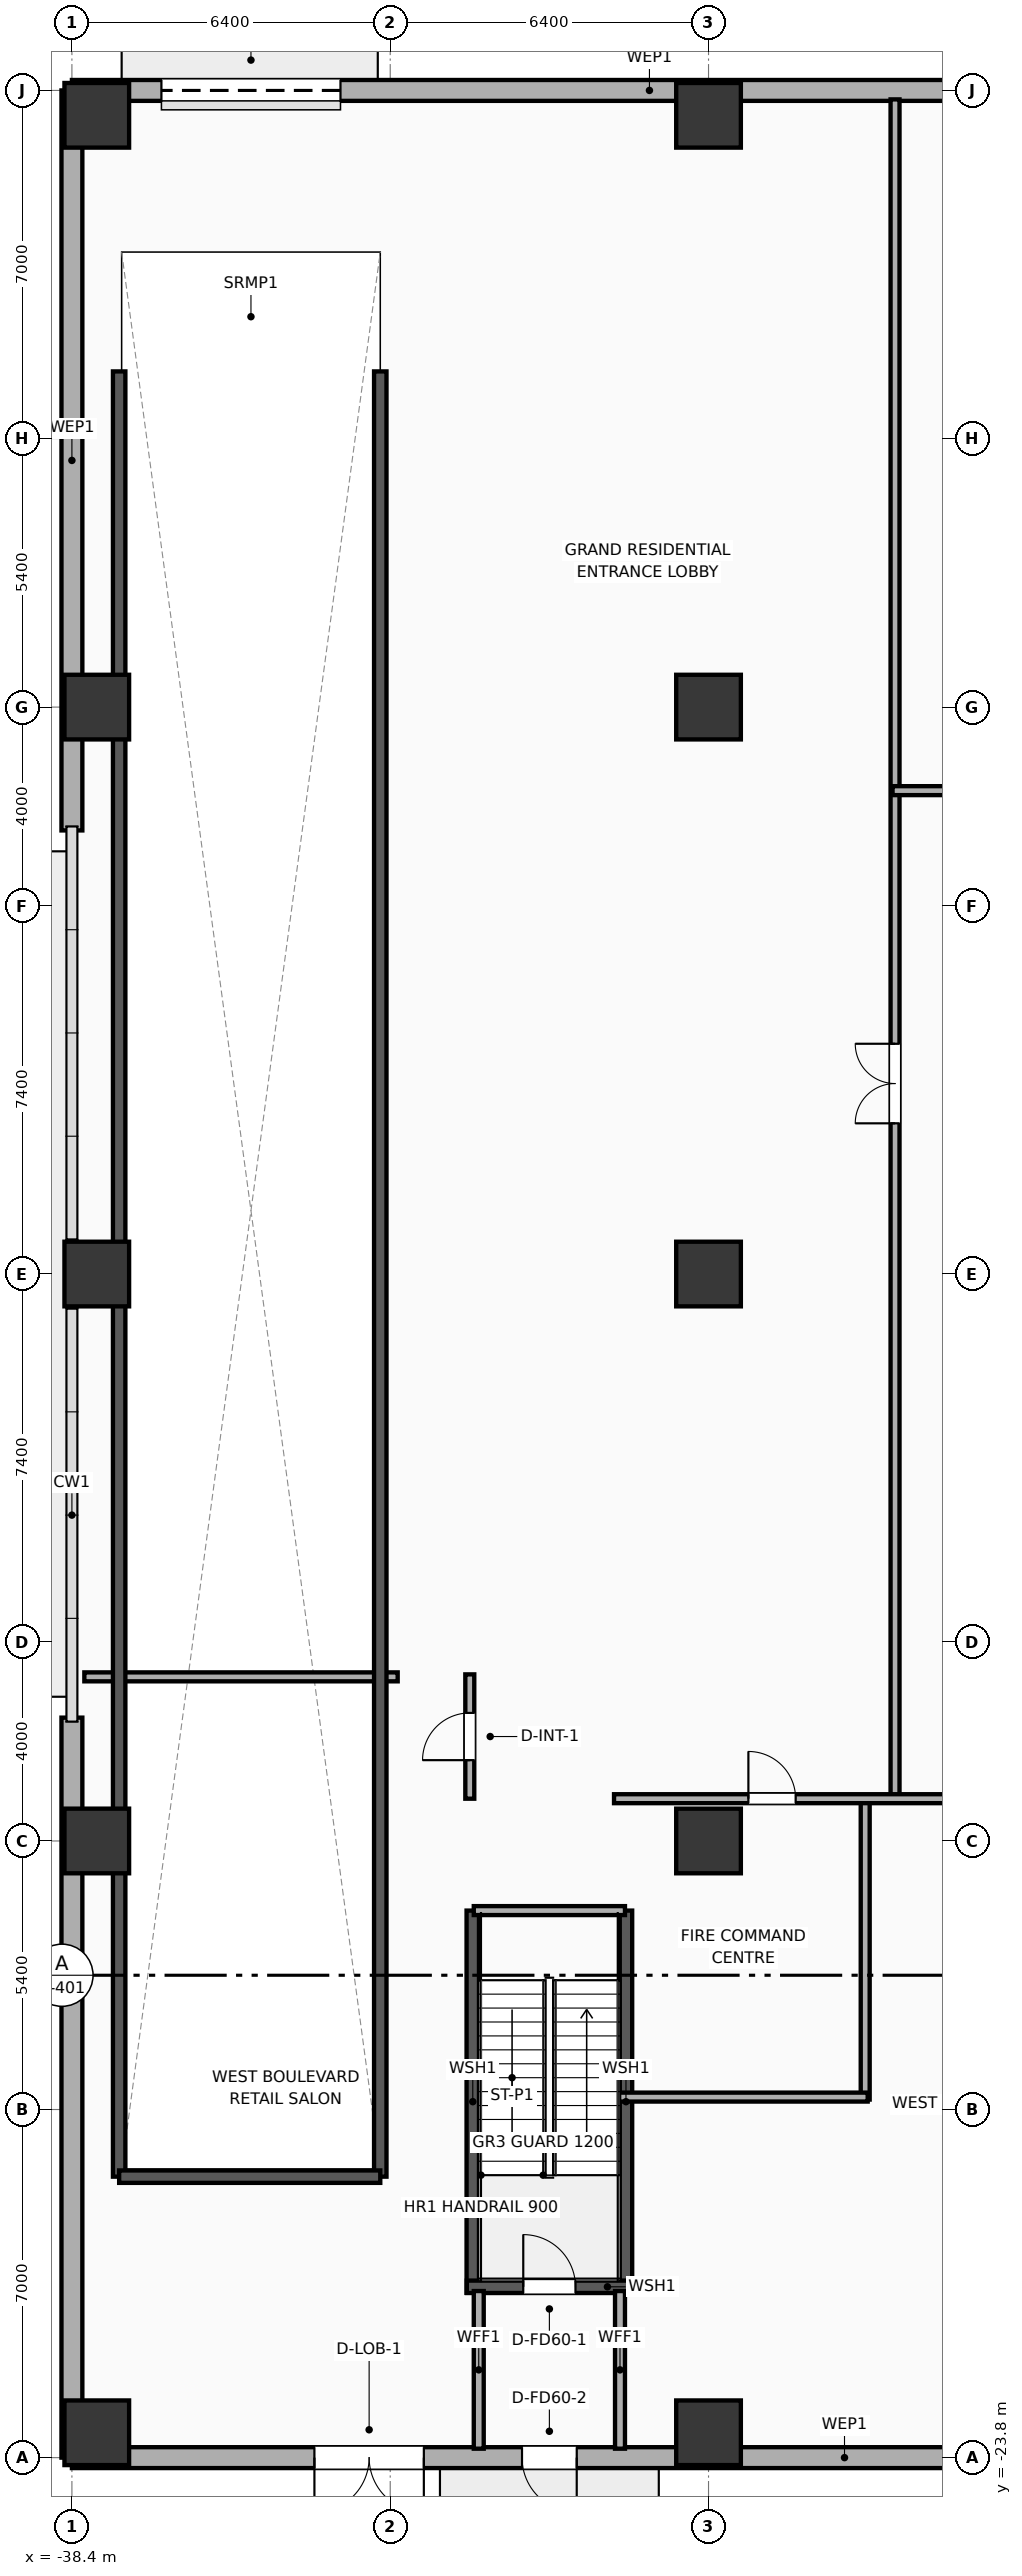
"""IFC4 building model, lengths in metres.
Left out: names, types, materials, properties, quantities, classifications, styles, units other than length and angle.
Written with IfcOpenShell. Run it as: python <this file> out.ifc"""

import sys

from ifc_helpers import new_model, si_unit, direction, frame, frame_2d, origin, origin_2d, place, context, subcontext, project, spatial, rectangle, extrude, element, fill, save


model = new_model("IFC4")
c1 = context("Model", 3, precision=1e-05, world=origin(), true_north=direction((0.0, 1.0)))
c2 = subcontext(c1, "Body", "Model", "MODEL_VIEW")
j1 = project(units=[si_unit("LENGTHUNIT", "METRE"), si_unit("PLANEANGLEUNIT", "RADIAN")], contexts=[c1])
p1 = place(None, origin())
s1 = spatial("IfcSite", under=j1, at=p1, CompositionType="ELEMENT")
p2 = place(p1, origin())
s2 = spatial("IfcBuilding", under=s1, at=p2, CompositionType="ELEMENT")
p3 = place(p2, origin())
s3 = spatial("IfcBuildingStorey", under=s2, at=p3, CompositionType="ELEMENT", Elevation=0.0)
for number, where, z_axis, x_axis in (
    (1, (-30.34, -20.485, 0.0), (0.0, 0.0, 1.0), (0.0, 1.0, 0.0)),
    (2, (-27.26, -20.485, 0.0), (0.0, 0.0, 1.0), (0.0, 1.0, 0.0)),
):
    element("IfcWall", number, at=place(p3, frame(where, z_axis=z_axis, x_axis=x_axis)), inside=s3, PredefinedType="SOLIDWALL", context=c2, shape_type="SweptSolid", body=[
        extrude(rectangle(XDim=7.685, YDim=0.25, at=frame_2d((3.843, 0.0))), origin(), (0.0, 0.0, 1.0), 4.92),
    ])
p4 = place(p3, frame((-30.46, -20.365, 0.0), z_axis=(0.0, 0.0, 1.0), x_axis=(1.0, 0.0, 0.0)))
e3 = element("IfcWall", 3, at=p4, inside=s3, PredefinedType="SOLIDWALL", context=c2, shape_type="SweptSolid", body=[
    extrude(rectangle(XDim=3.32, YDim=0.25, at=frame_2d((1.66, 0.0))), origin(), (0.0, 0.0, 1.0), 4.92),
])
p5 = place(p4, frame((1.135, 0.0, 0.0)))
e4 = element("IfcOpeningElement", 4, at=p5, cuts=e3, PredefinedType="OPENING", context=c2, shape_type="SweptSolid", body=[
    extrude(rectangle(XDim=1.05, YDim=2.05, at=frame_2d((0.525, 1.025))), frame((0.0, 0.135, 0.0), z_axis=(0.0, -1.0, 0.0), x_axis=(1.0, 0.0, 0.0)), (0.0, 0.0, 1.0), 0.27),
])
for number, where, z_axis, x_axis in (
    (5, (-37.9, -23.3, 0.0), (0.0, 0.0, 1.0), (1.0, 0.0, 0.0)),
    (6, (-37.9, -11.4, 0.0), (0.0, 0.0, 1.0), (1.0, 0.0, 0.0)),
    (7, (-37.9, 0.0, 0.0), (0.0, 0.0, 1.0), (1.0, 0.0, 0.0)),
    (8, (-37.9, 11.4, 0.0), (0.0, 0.0, 1.0), (1.0, 0.0, 0.0)),
    (9, (-37.9, 23.3, 0.0), (0.0, 0.0, 1.0), (1.0, 0.0, 0.0)),
    (10, (-25.6, -23.3, 0.0), (0.0, 0.0, 1.0), (1.0, 0.0, 0.0)),
    (11, (-25.6, -11.4, 0.0), (0.0, 0.0, 1.0), (1.0, 0.0, 0.0)),
    (12, (-25.6, 0.0, 0.0), (0.0, 0.0, 1.0), (1.0, 0.0, 0.0)),
    (13, (-25.6, 11.4, 0.0), (0.0, 0.0, 1.0), (1.0, 0.0, 0.0)),
    (14, (-25.6, 23.3, 0.0), (0.0, 0.0, 1.0), (1.0, 0.0, 0.0)),
):
    element("IfcColumn", number, at=place(p3, frame(where, z_axis=z_axis, x_axis=x_axis)), inside=s3, PredefinedType="COLUMN", context=c2, shape_type="SweptSolid", body=[
        extrude(rectangle(XDim=1.3, YDim=1.3, at=origin_2d()), origin(), (0.0, 0.0, 1.0), 5.2),
    ])
p6 = place(p3, frame((-13.5, -23.8, 0.0), z_axis=(0.0, 0.0, 1.0), x_axis=(-1.0, 0.0, 0.0)))
e15 = element("IfcWall", 15, at=p6, inside=s3, PredefinedType="ELEMENTEDWALL", context=c2, shape_type="SweptSolid", body=[
    extrude(rectangle(XDim=24.9, YDim=0.42, at=frame_2d((12.45, 0.0))), origin(), (0.0, 0.0, 1.0), 4.92),
])
p7 = place(p6, frame((14.75, 0.0, 0.0)))
e16 = element("IfcOpeningElement", 16, at=p7, cuts=e15, PredefinedType="OPENING", context=c2, shape_type="SweptSolid", body=[
    extrude(rectangle(XDim=1.1, YDim=2.05, at=frame_2d((0.55, 1.025))), frame((0.0, 0.22, 0.0), z_axis=(0.0, -1.0, 0.0), x_axis=(1.0, 0.0, 0.0)), (0.0, 0.0, 1.0), 0.44),
])
p8 = place(p6, frame((1.782, 0.0, 0.0)))
e17 = element("IfcOpeningElement", 17, at=p8, cuts=e15, PredefinedType="OPENING", context=c2, shape_type="SweptSolid", body=[
    extrude(rectangle(XDim=2.2, YDim=2.4, at=frame_2d((1.1, 1.2))), frame((0.0, 0.22, 0.0), z_axis=(0.0, -1.0, 0.0), x_axis=(1.0, 0.0, 0.0)), (0.0, 0.0, 1.0), 0.44),
])
p9 = place(p6, frame((17.824, 0.0, 0.0)))
e18 = element("IfcOpeningElement", 18, at=p9, cuts=e15, PredefinedType="OPENING", context=c2, shape_type="SweptSolid", body=[
    extrude(rectangle(XDim=2.2, YDim=2.4, at=frame_2d((1.1, 1.2))), frame((0.0, 0.22, 0.0), z_axis=(0.0, -1.0, 0.0), x_axis=(1.0, 0.0, 0.0)), (0.0, 0.0, 1.0), 0.44),
])
p10 = place(p3, frame((-13.5, 23.8, 0.0), z_axis=(0.0, 0.0, 1.0), x_axis=(-1.0, 0.0, 0.0)))
e19 = element("IfcWall", 19, at=p10, inside=s3, PredefinedType="ELEMENTEDWALL", context=c2, shape_type="SweptSolid", body=[
    extrude(rectangle(XDim=24.9, YDim=0.42, at=frame_2d((12.45, 0.0))), origin(), (0.0, 0.0, 1.0), 4.92),
])
p11 = place(p10, frame((19.5, 0.0, 0.0)))
e20 = element("IfcOpeningElement", 20, at=p11, cuts=e19, PredefinedType="OPENING", context=c2, shape_type="SweptSolid", body=[
    extrude(rectangle(XDim=3.6, YDim=3.0, at=frame_2d((1.8, 1.5))), frame((0.0, 0.22, 0.0), z_axis=(0.0, -1.0, 0.0), x_axis=(1.0, 0.0, 0.0)), (0.0, 0.0, 1.0), 0.44),
])
p12 = place(p10, frame((4.876, 0.0, 0.0)))
e21 = element("IfcOpeningElement", 21, at=p12, cuts=e19, PredefinedType="OPENING", context=c2, shape_type="SweptSolid", body=[
    extrude(rectangle(XDim=2.2, YDim=2.4, at=frame_2d((1.1, 1.2))), frame((0.0, 0.22, 0.0), z_axis=(0.0, -1.0, 0.0), x_axis=(1.0, 0.0, 0.0)), (0.0, 0.0, 1.0), 0.44),
])
for number, where, z_axis, x_axis in (
    (22, (-38.4, 23.8, 0.0), (0.0, 0.0, 1.0), (0.0, -1.0, 0.0)),
    (23, (-38.4, -8.92, 0.0), (0.0, 0.0, 1.0), (0.0, -1.0, 0.0)),
):
    element("IfcWall", number, at=place(p3, frame(where, z_axis=z_axis, x_axis=x_axis)), inside=s3, PredefinedType="ELEMENTEDWALL", context=c2, shape_type="SweptSolid", body=[
        extrude(rectangle(XDim=14.88, YDim=0.42, at=frame_2d((7.44, 0.0))), origin(), (0.0, 0.0, 1.0), 4.92),
    ])
for number, where, z_axis, x_axis in (
    (24, (-30.22, -23.62, 0.0), (0.0, 0.0, 1.0), (0.0, 1.0, 0.0)),
    (25, (-27.38, -23.62, 0.0), (0.0, 0.0, 1.0), (0.0, 1.0, 0.0)),
):
    element("IfcWall", number, at=place(p3, frame(where, z_axis=z_axis, x_axis=x_axis)), inside=s3, PredefinedType="PARTITIONING", context=c2, shape_type="SweptSolid", body=[
        extrude(rectangle(XDim=3.17, YDim=0.2, at=frame_2d((1.585, 0.0))), origin(), (0.0, 0.0, 1.0), 4.92),
    ])
p13 = place(p3, frame((-30.32, -12.8, 0.0), z_axis=(0.0, 0.0, 1.0), x_axis=(1.0, 0.0, 0.0)))
e26 = element("IfcWall", 26, at=p13, inside=s3, PredefinedType="PARTITIONING", context=c2, shape_type="SweptSolid", body=[
    extrude(rectangle(XDim=3.04, YDim=0.18, at=frame_2d((1.52, 0.0))), origin(), (0.0, 0.0, 1.0), 4.92),
])
p14 = place(p3, frame((-38.15, -8.1, 0.0), z_axis=(0.0, 0.0, 1.0), x_axis=(1.0, 0.0, 0.0)))
e27 = element("IfcWall", 27, at=p14, inside=s3, PredefinedType="PARTITIONING", context=c2, shape_type="SweptSolid", body=[
    extrude(rectangle(XDim=6.3, YDim=0.18, at=frame_2d((3.15, 0.0))), origin(), (0.0, 0.0, 1.0), 4.92),
])
p15 = place(p3, frame((-30.4, -10.55, 0.0), z_axis=(0.0, 0.0, 1.0), x_axis=(0.0, 1.0, 0.0)))
e28 = element("IfcWall", 28, at=p15, inside=s3, PredefinedType="PARTITIONING", context=c2, shape_type="SweptSolid", body=[
    extrude(rectangle(XDim=2.5, YDim=0.18, at=frame_2d((1.25, 0.0))), origin(), (0.0, 0.0, 1.0), 4.92),
])
p16 = place(p15, frame((0.775, 0.0, 0.0)))
e29 = element("IfcOpeningElement", 29, at=p16, cuts=e28, PredefinedType="OPENING", context=c2, shape_type="SweptSolid", body=[
    extrude(rectangle(XDim=0.95, YDim=2.05, at=frame_2d((0.475, 1.025))), frame((0.0, 0.1, 0.0), z_axis=(0.0, -1.0, 0.0), x_axis=(1.0, 0.0, 0.0)), (0.0, 0.0, 1.0), 0.2),
])
for number, where, z_axis, x_axis in (
    (30, (-37.45, -18.15, 0.0), (0.0, 0.0, 1.0), (0.0, 1.0, 0.0)),
    (31, (-32.2, -18.15, 0.0), (0.0, 0.0, 1.0), (0.0, 1.0, 0.0)),
):
    element("IfcWall", number, at=place(p3, frame(where, z_axis=z_axis, x_axis=x_axis)), inside=s3, PredefinedType="SOLIDWALL", context=c2, shape_type="SweptSolid", body=[
        extrude(rectangle(XDim=36.3, YDim=0.25, at=frame_2d((18.15, 0.0))), origin(), (0.0, 0.0, 1.0), 4.92),
    ])
p17 = place(p3, frame((-37.45, -18.15, 0.0), z_axis=(0.0, 0.0, 1.0), x_axis=(1.0, 0.0, 0.0)))
e32 = element("IfcWall", 32, at=p17, inside=s3, PredefinedType="SOLIDWALL", context=c2, shape_type="SweptSolid", body=[
    extrude(rectangle(XDim=5.25, YDim=0.25, at=frame_2d((2.625, 0.0))), origin(), (0.0, 0.0, 1.0), 4.92),
])
p18 = place(p3, frame((-22.45, -16.6, 0.0), z_axis=(0.0, 0.0, 1.0), x_axis=(0.0, 1.0, 0.0)))
e33 = element("IfcWall", 33, at=p18, inside=s3, PredefinedType="PARTITIONING", context=c2, shape_type="SweptSolid", body=[
    extrude(rectangle(XDim=6.1, YDim=0.18, at=frame_2d((3.05, 0.0))), origin(), (0.0, 0.0, 1.0), 4.92),
])
p19 = place(p3, frame((-27.45, -16.55, 0.0), z_axis=(0.0, 0.0, 1.0), x_axis=(1.0, 0.0, 0.0)))
e34 = element("IfcWall", 34, at=p19, inside=s3, PredefinedType="PARTITIONING", context=c2, shape_type="SweptSolid", body=[
    extrude(rectangle(XDim=5.05, YDim=0.18, at=frame_2d((2.525, 0.0))), origin(), (0.0, 0.0, 1.0), 4.92),
])
p20 = place(p3, frame((-21.85, -10.5, 0.0), z_axis=(0.0, 0.0, 1.0), x_axis=(0.0, 1.0, 0.0)))
e35 = element("IfcWall", 35, at=p20, inside=s3, PredefinedType="PARTITIONING", context=c2, shape_type="SweptSolid", body=[
    extrude(rectangle(XDim=34.12, YDim=0.18, at=frame_2d((17.06, 0.0))), origin(), (0.0, 0.0, 1.0), 4.92),
])
p21 = place(p20, frame((13.531, 0.0, 0.0)))
e36 = element("IfcOpeningElement", 36, at=p21, cuts=e35, PredefinedType="OPENING", context=c2, shape_type="SweptSolid", body=[
    extrude(rectangle(XDim=1.6, YDim=2.05, at=frame_2d((0.8, 1.025))), frame((0.0, 0.1, 0.0), z_axis=(0.0, -1.0, 0.0), x_axis=(1.0, 0.0, 0.0)), (0.0, 0.0, 1.0), 0.2),
])
p22 = place(p3, frame((-27.5, -10.55, 0.0), z_axis=(0.0, 0.0, 1.0), x_axis=(1.0, 0.0, 0.0)))
e37 = element("IfcWall", 37, at=p22, inside=s3, PredefinedType="PARTITIONING", context=c2, shape_type="SweptSolid", body=[
    extrude(rectangle(XDim=13.98, YDim=0.18, at=frame_2d((6.99, 0.0))), origin(), (0.0, 0.0, 1.0), 4.92),
])
p23 = place(p22, frame((2.701, 0.0, 0.0)))
e38 = element("IfcOpeningElement", 38, at=p23, cuts=e37, PredefinedType="OPENING", context=c2, shape_type="SweptSolid", body=[
    extrude(rectangle(XDim=0.95, YDim=2.05, at=frame_2d((0.475, 1.025))), frame((0.0, 0.1, 0.0), z_axis=(0.0, -1.0, 0.0), x_axis=(1.0, 0.0, 0.0)), (0.0, 0.0, 1.0), 0.2),
])
p24 = place(p22, frame((6.795, 0.0, 0.0)))
e39 = element("IfcOpeningElement", 39, at=p24, cuts=e37, PredefinedType="OPENING", context=c2, shape_type="SweptSolid", body=[
    extrude(rectangle(XDim=0.95, YDim=2.05, at=frame_2d((0.475, 1.025))), frame((0.0, 0.1, 0.0), z_axis=(0.0, -1.0, 0.0), x_axis=(1.0, 0.0, 0.0)), (0.0, 0.0, 1.0), 0.2),
])
p25 = place(p22, frame((11.243, 0.0, 0.0)))
e40 = element("IfcOpeningElement", 40, at=p25, cuts=e37, PredefinedType="OPENING", context=c2, shape_type="SweptSolid", body=[
    extrude(rectangle(XDim=1.0, YDim=2.05, at=frame_2d((0.5, 1.025))), frame((0.0, 0.1, 0.0), z_axis=(0.0, -1.0, 0.0), x_axis=(1.0, 0.0, 0.0)), (0.0, 0.0, 1.0), 0.2),
])
p26 = place(p3, frame((-21.9, 9.72, 0.0), z_axis=(0.0, 0.0, 1.0), x_axis=(1.0, 0.0, 0.0)))
e41 = element("IfcWall", 41, at=p26, inside=s3, PredefinedType="PARTITIONING", context=c2, shape_type="SweptSolid", body=[
    extrude(rectangle(XDim=8.38, YDim=0.18, at=frame_2d((4.19, 0.0))), origin(), (0.0, 0.0, 1.0), 4.92),
])
p27 = place(p26, frame((3.39, 0.0, 0.0)))
e42 = element("IfcOpeningElement", 42, at=p27, cuts=e41, PredefinedType="OPENING", context=c2, shape_type="SweptSolid", body=[
    extrude(rectangle(XDim=1.6, YDim=2.05, at=frame_2d((0.8, 1.025))), frame((0.0, 0.1, 0.0), z_axis=(0.0, -1.0, 0.0), x_axis=(1.0, 0.0, 0.0)), (0.0, 0.0, 1.0), 0.2),
])
p28 = place(p7, origin())
e43 = element("IfcDoor", 43, at=p28, inside=s3, OperationType="SINGLE_SWING_LEFT", PredefinedType="DOOR", context=c2, shape_type="SweptSolid", body=[
    extrude(rectangle(XDim=1.1, YDim=2.05, at=frame_2d((0.55, 1.025))), frame((0.0, 0.025, 0.0), z_axis=(0.0, -1.0, 0.0), x_axis=(1.0, 0.0, 0.0)), (0.0, 0.0, 1.0), 0.05),
])
fill(e16, e43)
p29 = place(p9, origin())
e44 = element("IfcDoor", 44, at=p29, inside=s3, OperationType="DOUBLE_DOOR_SINGLE_SWING", PredefinedType="DOOR", context=c2, shape_type="SweptSolid", body=[
    extrude(rectangle(XDim=2.2, YDim=2.4, at=frame_2d((1.1, 1.2))), frame((0.0, 0.025, 0.0), z_axis=(0.0, -1.0, 0.0), x_axis=(1.0, 0.0, 0.0)), (0.0, 0.0, 1.0), 0.05),
])
fill(e18, e44)
p30 = place(p11, origin())
e45 = element("IfcDoor", 45, at=p30, inside=s3, OperationType="ROLLINGUP", PredefinedType="GATE", context=c2, shape_type="SweptSolid", body=[
    extrude(rectangle(XDim=3.6, YDim=3.0, at=frame_2d((1.8, 1.5))), frame((0.0, 0.025, 0.0), z_axis=(0.0, -1.0, 0.0), x_axis=(1.0, 0.0, 0.0)), (0.0, 0.0, 1.0), 0.05),
])
fill(e20, e45)
p31 = place(p16, origin())
e46 = element("IfcDoor", 46, at=p31, inside=s3, OperationType="SINGLE_SWING_LEFT", PredefinedType="DOOR", context=c2, shape_type="SweptSolid", body=[
    extrude(rectangle(XDim=0.95, YDim=2.05, at=frame_2d((0.475, 1.025))), frame((0.0, 0.025, 0.0), z_axis=(0.0, -1.0, 0.0), x_axis=(1.0, 0.0, 0.0)), (0.0, 0.0, 1.0), 0.05),
])
fill(e29, e46)
p32 = place(p21, origin())
e47 = element("IfcDoor", 47, at=p32, inside=s3, OperationType="DOUBLE_DOOR_SINGLE_SWING", PredefinedType="DOOR", context=c2, shape_type="SweptSolid", body=[
    extrude(rectangle(XDim=1.6, YDim=2.05, at=frame_2d((0.8, 1.025))), frame((0.0, 0.025, 0.0), z_axis=(0.0, -1.0, 0.0), x_axis=(1.0, 0.0, 0.0)), (0.0, 0.0, 1.0), 0.05),
])
fill(e36, e47)
p33 = place(p23, origin())
e48 = element("IfcDoor", 48, at=p33, inside=s3, OperationType="SINGLE_SWING_LEFT", PredefinedType="DOOR", context=c2, shape_type="SweptSolid", body=[
    extrude(rectangle(XDim=0.95, YDim=2.05, at=frame_2d((0.475, 1.025))), frame((0.0, 0.025, 0.0), z_axis=(0.0, -1.0, 0.0), x_axis=(1.0, 0.0, 0.0)), (0.0, 0.0, 1.0), 0.05),
])
fill(e38, e48)
p34 = place(p5, origin())
e49 = element("IfcDoor", 49, at=p34, inside=s3, OperationType="SINGLE_SWING_LEFT", PredefinedType="DOOR", context=c2, shape_type="SweptSolid", body=[
    extrude(rectangle(XDim=1.05, YDim=2.05, at=frame_2d((0.525, 1.025))), frame((0.0, 0.025, 0.0), z_axis=(0.0, -1.0, 0.0), x_axis=(1.0, 0.0, 0.0)), (0.0, 0.0, 1.0), 0.05),
])
fill(e4, e49)
save(model, sys.argv[1])
